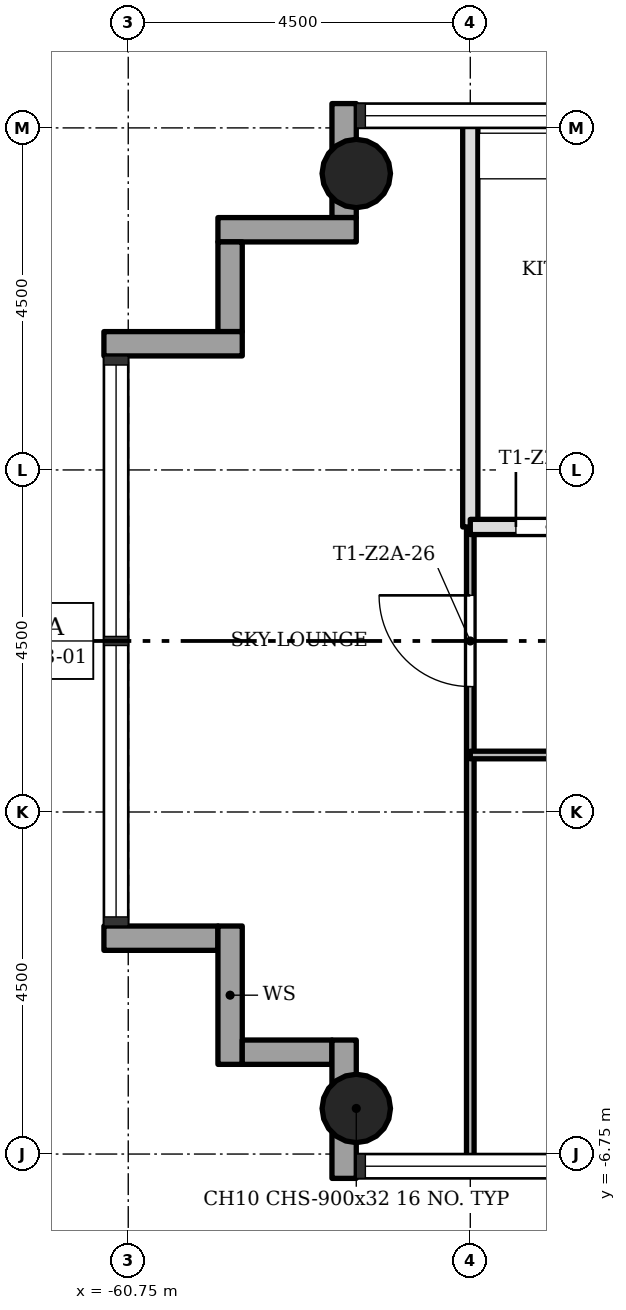
"""IFC4 building model, lengths in metres.
Left out: names, types, materials, properties, quantities, classifications, styles, units other than length and angle.
Written with IfcOpenShell. Run it as: python <this file> out.ifc"""

import sys

from ifc_helpers import new_model, si_unit, direction, frame, frame_2d, origin, origin_2d, place, context, subcontext, project, spatial, rectangle, hollow_circle, extrude, element, fill, save


model = new_model("IFC4")
c1 = context("Model", 3, precision=1e-05, world=origin(), true_north=direction((0.0, 1.0)))
c2 = subcontext(c1, "Body", "Model", "MODEL_VIEW")
j1 = project(units=[si_unit("LENGTHUNIT", "METRE"), si_unit("PLANEANGLEUNIT", "RADIAN")], contexts=[c1])
p1 = place(None, origin())
s1 = spatial("IfcSite", under=j1, at=p1, CompositionType="ELEMENT")
p2 = place(p1, origin())
s2 = spatial("IfcBuilding", under=s1, at=p2, CompositionType="ELEMENT")
p3 = place(p2, frame((0.0, 0.0, 117.4)))
s3 = spatial("IfcBuildingStorey", under=s2, at=p3, CompositionType="ELEMENT", Elevation=117.4)
for number, where, z_axis, x_axis in (
    (1, (-57.75, -6.15, 0.0), (0.0, 0.0, 1.0), (1.0, 0.0, 0.0)),
    (2, (-57.75, 6.15, 0.0), (0.0, 0.0, 1.0), (1.0, 0.0, 0.0)),
):
    element("IfcColumn", number, at=place(p3, frame(where, z_axis=z_axis, x_axis=x_axis)), inside=s3, PredefinedType="COLUMN", context=c2, shape_type="SweptSolid", body=[
        extrude(hollow_circle(Radius=0.45, WallThickness=0.032, at=origin_2d()), origin(), (0.0, 0.0, 1.0), 3.4),
    ])
p4 = place(p3, frame((-61.07, -3.91, -0.3), z_axis=(0.0, 0.0, 1.0), x_axis=(1.0, 0.0, 0.0)))
e3 = element("IfcWall", 3, at=p4, inside=s3, PredefinedType="STANDARD", context=c2, shape_type="SweptSolid", body=[
    extrude(rectangle(XDim=1.5, YDim=0.32, at=frame_2d((0.75, 0.0))), origin(), (0.0, 0.0, 1.0), 3.4),
])
p5 = place(p3, frame((-59.41, -3.75, -0.3), z_axis=(0.0, 0.0, 1.0), x_axis=(0.0, -1.0, 0.0)))
e4 = element("IfcWall", 4, at=p5, inside=s3, PredefinedType="STANDARD", context=c2, shape_type="SweptSolid", body=[
    extrude(rectangle(XDim=1.82, YDim=0.32, at=frame_2d((0.91, 0.0))), origin(), (0.0, 0.0, 1.0), 3.4),
])
p6 = place(p3, frame((-59.25, -5.41, -0.3), z_axis=(0.0, 0.0, 1.0), x_axis=(1.0, 0.0, 0.0)))
e5 = element("IfcWall", 5, at=p6, inside=s3, PredefinedType="STANDARD", context=c2, shape_type="SweptSolid", body=[
    extrude(rectangle(XDim=1.18, YDim=0.32, at=frame_2d((0.59, 0.0))), origin(), (0.0, 0.0, 1.0), 3.4),
])
p7 = place(p3, frame((-57.91, -5.25, -0.3), z_axis=(0.0, 0.0, 1.0), x_axis=(0.0, -1.0, 0.0)))
e6 = element("IfcWall", 6, at=p7, inside=s3, PredefinedType="STANDARD", context=c2, shape_type="SweptSolid", body=[
    extrude(rectangle(XDim=1.82, YDim=0.32, at=frame_2d((0.91, 0.0))), origin(), (0.0, 0.0, 1.0), 3.4),
])
p8 = place(p3, frame((-57.91, 7.07, -0.3), z_axis=(0.0, 0.0, 1.0), x_axis=(0.0, -1.0, 0.0)))
e7 = element("IfcWall", 7, at=p8, inside=s3, PredefinedType="STANDARD", context=c2, shape_type="SweptSolid", body=[
    extrude(rectangle(XDim=1.5, YDim=0.32, at=frame_2d((0.75, 0.0))), origin(), (0.0, 0.0, 1.0), 3.4),
])
p9 = place(p3, frame((-57.75, 5.41, -0.3), z_axis=(0.0, 0.0, 1.0), x_axis=(-1.0, 0.0, 0.0)))
e8 = element("IfcWall", 8, at=p9, inside=s3, PredefinedType="STANDARD", context=c2, shape_type="SweptSolid", body=[
    extrude(rectangle(XDim=1.82, YDim=0.32, at=frame_2d((0.91, 0.0))), origin(), (0.0, 0.0, 1.0), 3.4),
])
p10 = place(p3, frame((-59.41, 5.25, -0.3), z_axis=(0.0, 0.0, 1.0), x_axis=(0.0, -1.0, 0.0)))
e9 = element("IfcWall", 9, at=p10, inside=s3, PredefinedType="STANDARD", context=c2, shape_type="SweptSolid", body=[
    extrude(rectangle(XDim=1.18, YDim=0.32, at=frame_2d((0.59, 0.0))), origin(), (0.0, 0.0, 1.0), 3.4),
])
p11 = place(p3, frame((-59.25, 3.91, -0.3), z_axis=(0.0, 0.0, 1.0), x_axis=(-1.0, 0.0, 0.0)))
e10 = element("IfcWall", 10, at=p11, inside=s3, PredefinedType="STANDARD", context=c2, shape_type="SweptSolid", body=[
    extrude(rectangle(XDim=1.82, YDim=0.32, at=frame_2d((0.91, 0.0))), origin(), (0.0, 0.0, 1.0), 3.4),
])
p12 = place(p3, frame((-56.25, -6.85, 0.0), z_axis=(0.0, 0.0, 1.0), x_axis=(0.0, 1.0, 0.0)))
e11 = element("IfcWall", 11, at=p12, inside=s3, PredefinedType="PARTITIONING", context=c2, shape_type="SweptSolid", body=[
    extrude(rectangle(XDim=8.35, YDim=0.1, at=frame_2d((4.175, 0.0))), origin(), (0.0, 0.0, 1.0), 3.0),
])
p13 = place(p12, frame((6.25, 0.0, 0.0)))
e12 = element("IfcOpeningElement", 12, at=p13, cuts=e11, PredefinedType="OPENING", context=c2, shape_type="SweptSolid", body=[
    extrude(rectangle(XDim=1.2, YDim=2.1, at=frame_2d((0.6, 1.05))), frame((0.0, 0.06, 0.0), z_axis=(0.0, -1.0, 0.0), x_axis=(1.0, 0.0, 0.0)), (0.0, 0.0, 1.0), 0.12),
])
p14 = place(p3, frame((-56.25, 1.5, 0.0), z_axis=(0.0, 0.0, 1.0), x_axis=(0.0, 1.0, 0.0)))
e13 = element("IfcWall", 13, at=p14, inside=s3, PredefinedType="SOLIDWALL", context=c2, shape_type="SweptSolid", body=[
    extrude(rectangle(XDim=5.35, YDim=0.2, at=frame_2d((2.675, 0.0))), origin(), (0.0, 0.0, 1.0), 3.0),
])
p15 = place(p3, frame((-56.25, -1.5, 0.0), z_axis=(0.0, 0.0, 1.0), x_axis=(1.0, 0.0, 0.0)))
e14 = element("IfcWall", 14, at=p15, inside=s3, PredefinedType="PARTITIONING", context=c2, shape_type="SweptSolid", body=[
    extrude(rectangle(XDim=4.5, YDim=0.1, at=frame_2d((2.25, 0.0))), origin(), (0.0, 0.0, 1.0), 3.0),
])
p16 = place(p15, frame((1.8, 0.0, 0.0)))
e15 = element("IfcOpeningElement", 15, at=p16, cuts=e14, PredefinedType="OPENING", context=c2, shape_type="SweptSolid", body=[
    extrude(rectangle(XDim=0.9, YDim=2.1, at=frame_2d((0.45, 1.05))), frame((0.0, 0.06, 0.0), z_axis=(0.0, -1.0, 0.0), x_axis=(1.0, 0.0, 0.0)), (0.0, 0.0, 1.0), 0.12),
])
p17 = place(p3, frame((-56.25, 1.5, 0.0), z_axis=(0.0, 0.0, 1.0), x_axis=(1.0, 0.0, 0.0)))
e16 = element("IfcWall", 16, at=p17, inside=s3, PredefinedType="SOLIDWALL", context=c2, shape_type="SweptSolid", body=[
    extrude(rectangle(XDim=4.5, YDim=0.2, at=frame_2d((2.25, 0.0))), origin(), (0.0, 0.0, 1.0), 3.0),
])
p18 = place(p17, frame((0.6, 0.0, 0.0)))
e17 = element("IfcOpeningElement", 17, at=p18, cuts=e16, PredefinedType="OPENING", context=c2, shape_type="SweptSolid", body=[
    extrude(rectangle(XDim=0.9, YDim=2.1, at=frame_2d((0.45, 1.05))), frame((0.0, 0.11, 0.0), z_axis=(0.0, -1.0, 0.0), x_axis=(1.0, 0.0, 0.0)), (0.0, 0.0, 1.0), 0.22),
])
p19 = place(p18, origin())
e18 = element("IfcDoor", 18, at=p19, inside=s3, OperationType="SINGLE_SWING_RIGHT", PredefinedType="DOOR", context=c2, shape_type="SweptSolid", body=[
    extrude(rectangle(XDim=0.9, YDim=2.1, at=frame_2d((0.45, 1.05))), frame((0.0, 0.025, 0.0), z_axis=(0.0, -1.0, 0.0), x_axis=(1.0, 0.0, 0.0)), (0.0, 0.0, 1.0), 0.05),
])
fill(e17, e18)
p20 = place(p13, origin())
e19 = element("IfcDoor", 19, at=p20, inside=s3, OperationType="SINGLE_SWING_LEFT", PredefinedType="DOOR", context=c2, shape_type="SweptSolid", body=[
    extrude(rectangle(XDim=1.2, YDim=2.1, at=frame_2d((0.6, 1.05))), frame((0.0, 0.025, 0.0), z_axis=(0.0, -1.0, 0.0), x_axis=(1.0, 0.0, 0.0)), (0.0, 0.0, 1.0), 0.05),
])
fill(e12, e19)
save(model, sys.argv[1])
